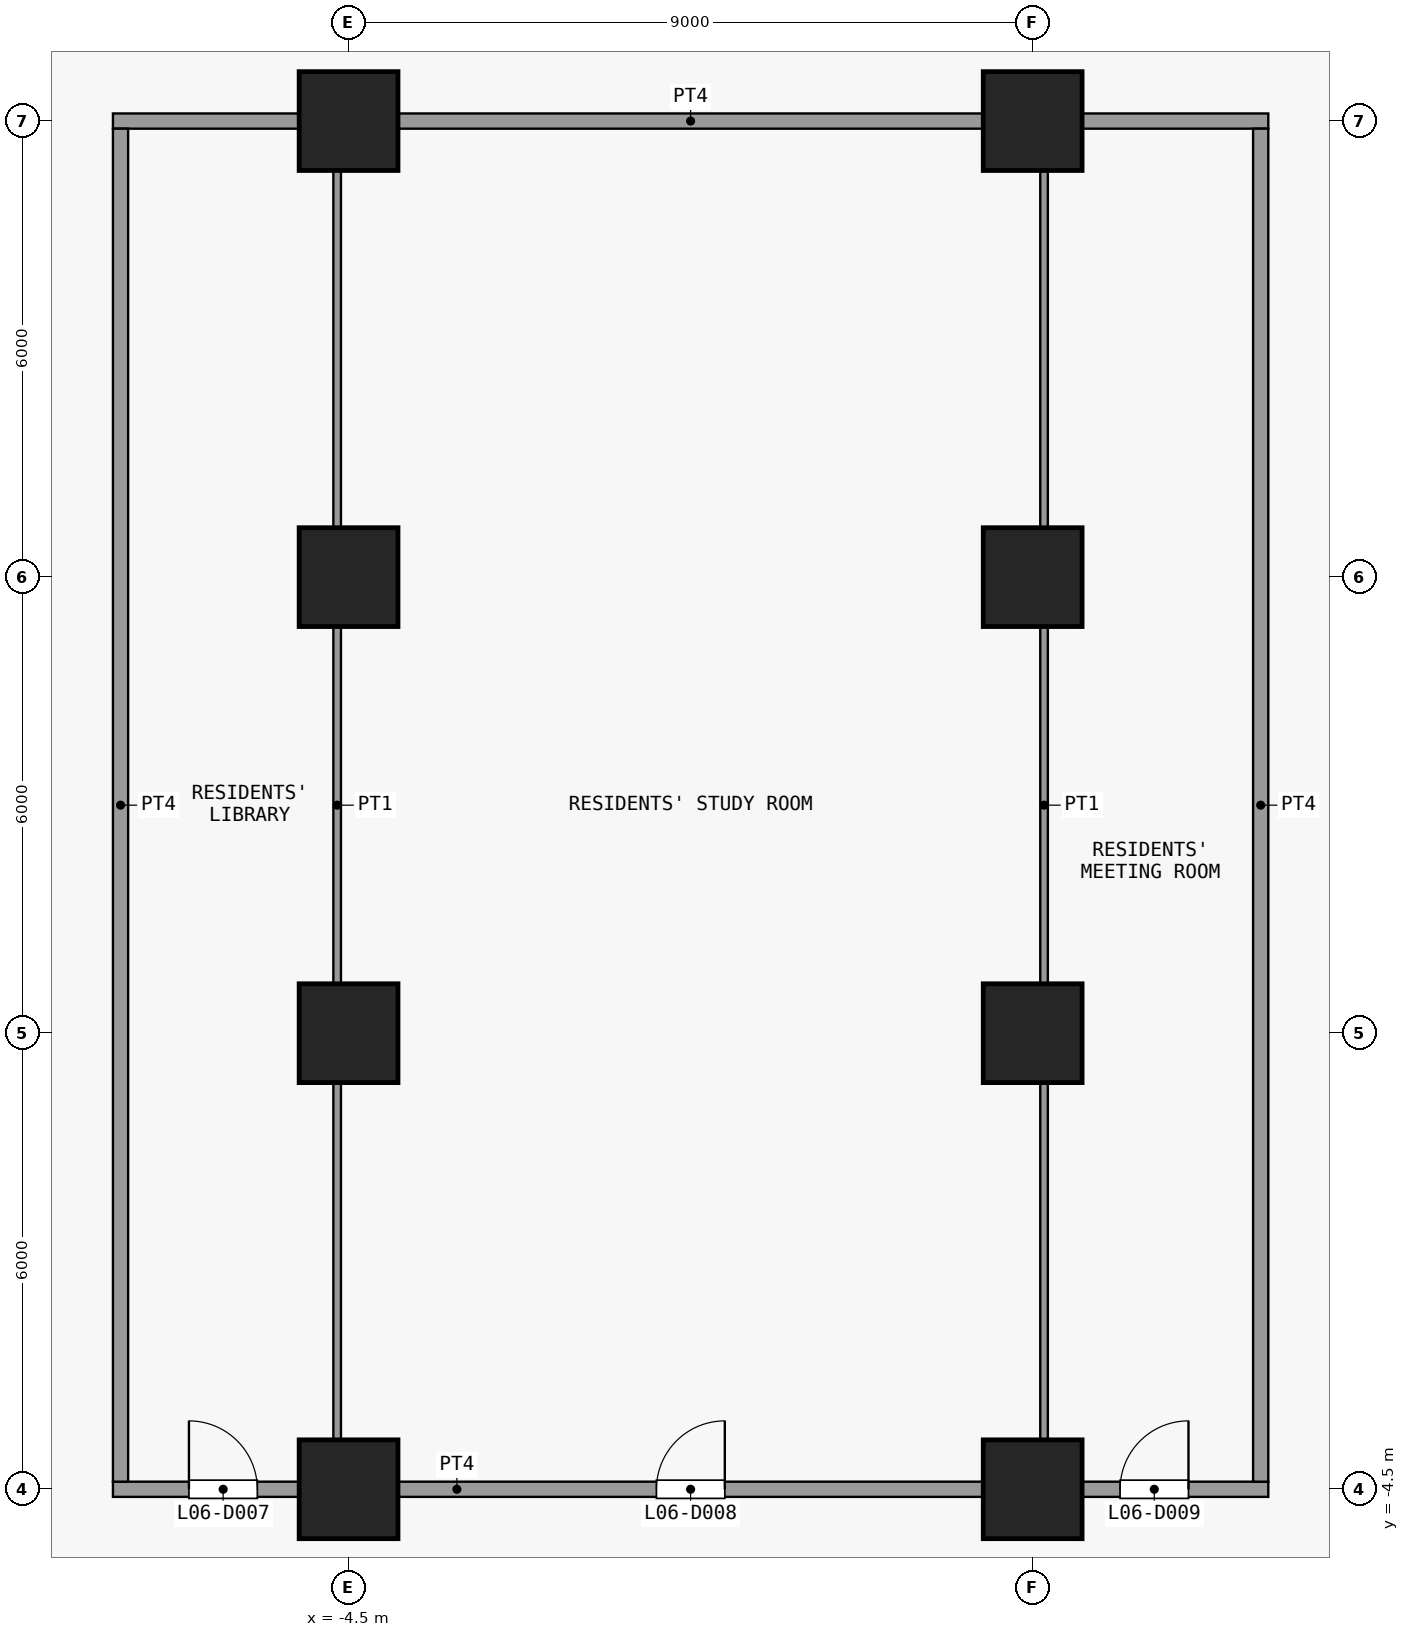
"""IFC4 building model, lengths in metres.
Left out: names, types, materials, properties, quantities, classifications, styles, units other than length and angle.
Written with IfcOpenShell. Run it as: python <this file> out.ifc"""

import sys

from ifc_helpers import new_model, si_unit, direction, frame, frame_2d, origin, origin_2d, place, context, subcontext, project, spatial, rectangle, extrude, element, fill, save


model = new_model("IFC4")
c1 = context("Model", 3, precision=1e-05, world=origin(), true_north=direction((0.0, 1.0)))
c2 = subcontext(c1, "Body", "Model", "MODEL_VIEW")
j1 = project(units=[si_unit("LENGTHUNIT", "METRE"), si_unit("PLANEANGLEUNIT", "RADIAN")], contexts=[c1])
p1 = place(None, origin())
s1 = spatial("IfcSite", under=j1, at=p1, CompositionType="ELEMENT")
p2 = place(p1, origin())
s2 = spatial("IfcBuilding", under=s1, at=p2, CompositionType="ELEMENT")
p3 = place(p2, frame((0.0, 0.0, 32.5)))
s3 = spatial("IfcBuildingStorey", under=s2, at=p3, CompositionType="ELEMENT", Elevation=32.5)
for number, where, z_axis, x_axis in (
    (1, (-4.5, -4.5, 0.0), (0.0, 0.0, 1.0), (1.0, 0.0, 0.0)),
    (2, (-4.5, 1.5, 0.0), (0.0, 0.0, 1.0), (1.0, 0.0, 0.0)),
    (3, (-4.5, 7.5, 0.0), (0.0, 0.0, 1.0), (1.0, 0.0, 0.0)),
    (4, (-4.5, 13.5, 0.0), (0.0, 0.0, 1.0), (1.0, 0.0, 0.0)),
    (5, (4.5, -4.5, 0.0), (0.0, 0.0, 1.0), (1.0, 0.0, 0.0)),
    (6, (4.5, 1.5, 0.0), (0.0, 0.0, 1.0), (1.0, 0.0, 0.0)),
    (7, (4.5, 7.5, 0.0), (0.0, 0.0, 1.0), (1.0, 0.0, 0.0)),
    (8, (4.5, 13.5, 0.0), (0.0, 0.0, 1.0), (1.0, 0.0, 0.0)),
):
    element("IfcColumn", number, at=place(p3, frame(where, z_axis=z_axis, x_axis=x_axis)), inside=s3, PredefinedType="COLUMN", context=c2, shape_type="SweptSolid", body=[
        extrude(rectangle(XDim=1.3, YDim=1.3, at=origin_2d()), origin(), (0.0, 0.0, 1.0), 3.6),
    ])
p4 = place(p3, frame((-7.6, -4.5, 0.0), z_axis=(0.0, 0.0, 1.0), x_axis=(1.0, 0.0, 0.0)))
e9 = element("IfcWall", 9, at=p4, inside=s3, PredefinedType="PARTITIONING", context=c2, shape_type="SweptSolid", body=[
    extrude(rectangle(XDim=15.2, YDim=0.2, at=frame_2d((7.6, 0.0))), origin(), (0.0, 0.0, 1.0), 3.3),
])
p5 = place(p4, frame((1.0, 0.0, 0.0)))
e10 = element("IfcOpeningElement", 10, at=p5, cuts=e9, PredefinedType="OPENING", context=c2, shape_type="SweptSolid", body=[
    extrude(rectangle(XDim=0.9, YDim=2.1, at=frame_2d((0.45, 1.05))), frame((0.0, 0.11, 0.0), z_axis=(0.0, -1.0, 0.0), x_axis=(1.0, 0.0, 0.0)), (0.0, 0.0, 1.0), 0.22),
])
p6 = place(p4, frame((7.15, 0.0, 0.0)))
e11 = element("IfcOpeningElement", 11, at=p6, cuts=e9, PredefinedType="OPENING", context=c2, shape_type="SweptSolid", body=[
    extrude(rectangle(XDim=0.9, YDim=2.1, at=frame_2d((0.45, 1.05))), frame((0.0, 0.11, 0.0), z_axis=(0.0, -1.0, 0.0), x_axis=(1.0, 0.0, 0.0)), (0.0, 0.0, 1.0), 0.22),
])
p7 = place(p4, frame((13.25, 0.0, 0.0)))
e12 = element("IfcOpeningElement", 12, at=p7, cuts=e9, PredefinedType="OPENING", context=c2, shape_type="SweptSolid", body=[
    extrude(rectangle(XDim=0.9, YDim=2.1, at=frame_2d((0.45, 1.05))), frame((0.0, 0.11, 0.0), z_axis=(0.0, -1.0, 0.0), x_axis=(1.0, 0.0, 0.0)), (0.0, 0.0, 1.0), 0.22),
])
p8 = place(p3, frame((-7.6, 13.5, 0.0), z_axis=(0.0, 0.0, 1.0), x_axis=(1.0, 0.0, 0.0)))
e13 = element("IfcWall", 13, at=p8, inside=s3, PredefinedType="PARTITIONING", context=c2, shape_type="SweptSolid", body=[
    extrude(rectangle(XDim=15.2, YDim=0.2, at=frame_2d((7.6, 0.0))), origin(), (0.0, 0.0, 1.0), 3.3),
])
p9 = place(p3, frame((-7.5, -4.4, 0.0), z_axis=(0.0, 0.0, 1.0), x_axis=(0.0, 1.0, 0.0)))
e14 = element("IfcWall", 14, at=p9, inside=s3, PredefinedType="PARTITIONING", context=c2, shape_type="SweptSolid", body=[
    extrude(rectangle(XDim=17.8, YDim=0.2, at=frame_2d((8.9, 0.0))), origin(), (0.0, 0.0, 1.0), 3.3),
])
for number, where, z_axis, x_axis in (
    (15, (-4.65, -4.4, 0.0), (0.0, 0.0, 1.0), (0.0, 1.0, 0.0)),
    (16, (4.65, -4.4, 0.0), (0.0, 0.0, 1.0), (0.0, 1.0, 0.0)),
):
    element("IfcWall", number, at=place(p3, frame(where, z_axis=z_axis, x_axis=x_axis)), inside=s3, PredefinedType="PARTITIONING", context=c2, shape_type="SweptSolid", body=[
        extrude(rectangle(XDim=17.8, YDim=0.1, at=frame_2d((8.9, 0.0))), origin(), (0.0, 0.0, 1.0), 3.3),
    ])
p10 = place(p3, frame((7.5, -4.4, 0.0), z_axis=(0.0, 0.0, 1.0), x_axis=(0.0, 1.0, 0.0)))
e17 = element("IfcWall", 17, at=p10, inside=s3, PredefinedType="PARTITIONING", context=c2, shape_type="SweptSolid", body=[
    extrude(rectangle(XDim=17.8, YDim=0.2, at=frame_2d((8.9, 0.0))), origin(), (0.0, 0.0, 1.0), 3.3),
])
p11 = place(p5, origin())
e18 = element("IfcDoor", 18, at=p11, inside=s3, OperationType="SINGLE_SWING_RIGHT", PredefinedType="DOOR", context=c2, shape_type="SweptSolid", body=[
    extrude(rectangle(XDim=0.9, YDim=2.1, at=frame_2d((0.45, 1.05))), frame((0.0, 0.025, 0.0), z_axis=(0.0, -1.0, 0.0), x_axis=(1.0, 0.0, 0.0)), (0.0, 0.0, 1.0), 0.05),
])
fill(e10, e18)
p12 = place(p6, origin())
e19 = element("IfcDoor", 19, at=p12, inside=s3, OperationType="SINGLE_SWING_LEFT", PredefinedType="DOOR", context=c2, shape_type="SweptSolid", body=[
    extrude(rectangle(XDim=0.9, YDim=2.1, at=frame_2d((0.45, 1.05))), frame((0.0, 0.025, 0.0), z_axis=(0.0, -1.0, 0.0), x_axis=(1.0, 0.0, 0.0)), (0.0, 0.0, 1.0), 0.05),
])
fill(e11, e19)
p13 = place(p7, origin())
e20 = element("IfcDoor", 20, at=p13, inside=s3, OperationType="SINGLE_SWING_LEFT", PredefinedType="DOOR", context=c2, shape_type="SweptSolid", body=[
    extrude(rectangle(XDim=0.9, YDim=2.1, at=frame_2d((0.45, 1.05))), frame((0.0, 0.025, 0.0), z_axis=(0.0, -1.0, 0.0), x_axis=(1.0, 0.0, 0.0)), (0.0, 0.0, 1.0), 0.05),
])
fill(e12, e20)
save(model, sys.argv[1])
